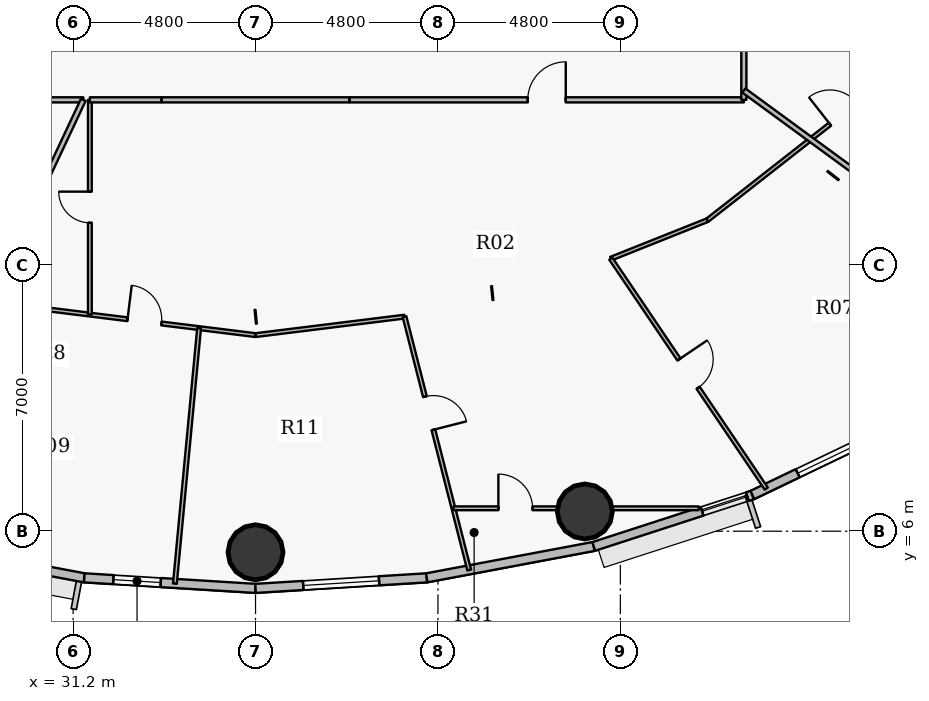
"""IFC4 building model, lengths in metres.
Left out: names, types, materials, properties, quantities, classifications, styles, units other than length and angle.
Written with IfcOpenShell. Run it as: python <this file> out.ifc"""

import sys

from ifc_helpers import new_model, si_unit, direction, frame, frame_2d, origin, origin_2d, place, context, subcontext, project, spatial, rectangle, hollow_circle, extrude, source, transform, mapped, element, fill, save


model = new_model("IFC4")
c1 = context("Model", 3, precision=1e-05, world=origin(), true_north=direction((0.0, 1.0)))
c2 = subcontext(c1, "Body", "Model", "MODEL_VIEW")
j1 = project(units=[si_unit("LENGTHUNIT", "METRE"), si_unit("PLANEANGLEUNIT", "RADIAN")], contexts=[c1])
p1 = place(None, origin())
s1 = spatial("IfcSite", under=j1, at=p1, CompositionType="ELEMENT")
p2 = place(p1, origin())
s2 = spatial("IfcBuilding", under=s1, at=p2, CompositionType="ELEMENT")
p3 = place(p2, frame((0.0, 0.0, 134.7)))
s3 = spatial("IfcBuildingStorey", under=s2, at=p3, CompositionType="ELEMENT", Elevation=134.7)
for number, where, z_axis, x_axis in (
    (1, (36.0, 5.445, 0.0), (0.0, 0.0, 1.0), (1.0, 0.0, 0.0)),
    (2, (44.666, 6.519, 0.0), (0.0, 0.0, 1.0), (1.0, 0.0, 0.0)),
):
    element("IfcColumn", number, at=place(p3, frame(where, z_axis=z_axis, x_axis=x_axis)), inside=s3, PredefinedType="COLUMN", context=c2, shape_type="SweptSolid", body=[
        extrude(hollow_circle(Radius=0.725, WallThickness=0.042, at=origin_2d()), origin(), (0.0, 0.0, 1.0), 3.75),
    ])
p4 = place(p3, frame((31.494, 4.773, 0.0), z_axis=(0.0, 0.0, 1.0), x_axis=(-0.982789252177, 0.184730305596, 0.0)))
e3 = element("IfcWall", 3, at=p4, inside=s3, PredefinedType="SOLIDWALL", context=c2, shape_type="SweptSolid", body=[
    extrude(rectangle(XDim=4.471, YDim=0.24, at=frame_2d((2.235, 0.0))), origin(), (0.0, 0.0, 1.0), 3.5),
])
p5 = place(p4, frame((1.236, 0.0, 0.9)))
e4 = element("IfcOpeningElement", 4, at=p5, cuts=e3, PredefinedType="OPENING", context=c2, shape_type="SweptSolid", body=[
    extrude(rectangle(XDim=2.0, YDim=1.75, at=origin_2d()), frame((1.0, 0.13, 0.875), z_axis=(0.0, -1.0, 0.0), x_axis=(1.0, 0.0, 0.0)), (0.0, 0.0, 1.0), 0.26),
])
p6 = place(p3, frame((36.0, 4.495, 0.0), z_axis=(0.0, 0.0, 1.0), x_axis=(-0.998107531589, 0.061492726276, 0.0)))
e5 = element("IfcWall", 5, at=p6, inside=s3, PredefinedType="SOLIDWALL", context=c2, shape_type="SweptSolid", body=[
    extrude(rectangle(XDim=4.514, YDim=0.24, at=frame_2d((2.257, 0.0))), origin(), (0.0, 0.0, 1.0), 3.5),
])
p7 = place(p6, frame((2.499, 0.0, 0.9)))
e6 = element("IfcOpeningElement", 6, at=p7, cuts=e5, PredefinedType="OPENING", context=c2, shape_type="SweptSolid", body=[
    extrude(rectangle(XDim=1.25, YDim=1.65, at=origin_2d()), frame((0.625, 0.13, 0.825), z_axis=(0.0, -1.0, 0.0), x_axis=(1.0, 0.0, 0.0)), (0.0, 0.0, 1.0), 0.26),
])
p8 = place(p3, frame((40.506, 4.773, 0.0), z_axis=(0.0, 0.0, 1.0), x_axis=(-0.998107531589, -0.061492726276, 0.0)))
e7 = element("IfcWall", 7, at=p8, inside=s3, PredefinedType="SOLIDWALL", context=c2, shape_type="SweptSolid", body=[
    extrude(rectangle(XDim=4.514, YDim=0.24, at=frame_2d((2.257, 0.0))), origin(), (0.0, 0.0, 1.0), 3.5),
])
p9 = place(p8, frame((1.257, 0.0, 0.9)))
e8 = element("IfcOpeningElement", 8, at=p9, cuts=e7, PredefinedType="OPENING", context=c2, shape_type="SweptSolid", body=[
    extrude(rectangle(XDim=2.0, YDim=1.75, at=origin_2d()), frame((1.0, 0.13, 0.875), z_axis=(0.0, -1.0, 0.0), x_axis=(1.0, 0.0, 0.0)), (0.0, 0.0, 1.0), 0.26),
])
p10 = place(p3, frame((44.9, 5.599, 0.0), z_axis=(0.0, 0.0, 1.0), x_axis=(-0.982789252177, -0.184730305596, 0.0)))
e9 = element("IfcWall", 9, at=p10, inside=s3, PredefinedType="SOLIDWALL", context=c2, shape_type="SweptSolid", body=[
    extrude(rectangle(XDim=4.471, YDim=0.24, at=frame_2d((2.235, 0.0))), origin(), (0.0, 0.0, 1.0), 3.5),
])
p11 = place(p3, frame((49.074, 6.953, 0.0), z_axis=(0.0, 0.0, 1.0), x_axis=(-0.951211346073, -0.308540070495, 0.0)))
e10 = element("IfcWall", 10, at=p11, inside=s3, PredefinedType="SOLIDWALL", context=c2, shape_type="SweptSolid", body=[
    extrude(rectangle(XDim=4.388, YDim=0.24, at=frame_2d((2.194, 0.0))), origin(), (0.0, 0.0, 1.0), 3.5),
])
p12 = place(p11, frame((0.14, 0.0, 0.9)))
e11 = element("IfcOpeningElement", 11, at=p12, cuts=e10, PredefinedType="OPENING", context=c2, shape_type="SweptSolid", body=[
    extrude(rectangle(XDim=1.25, YDim=1.65, at=origin_2d()), frame((0.625, 0.13, 0.825), z_axis=(0.0, -1.0, 0.0), x_axis=(1.0, 0.0, 0.0)), (0.0, 0.0, 1.0), 0.26),
])
p13 = place(p3, frame((52.925, 8.801, 0.0), z_axis=(0.0, 0.0, 1.0), x_axis=(-0.901589935876, -0.432591709962, 0.0)))
e12 = element("IfcWall", 12, at=p13, inside=s3, PredefinedType="SOLIDWALL", context=c2, shape_type="SweptSolid", body=[
    extrude(rectangle(XDim=4.272, YDim=0.24, at=frame_2d((2.136, 0.0))), origin(), (0.0, 0.0, 1.0), 3.5),
])
p14 = place(p13, frame((0.949, 0.0, 0.9)))
e13 = element("IfcOpeningElement", 13, at=p14, cuts=e12, PredefinedType="OPENING", context=c2, shape_type="SweptSolid", body=[
    extrude(rectangle(XDim=2.0, YDim=1.75, at=origin_2d()), frame((1.0, 0.13, 0.875), z_axis=(0.0, -1.0, 0.0), x_axis=(1.0, 0.0, 0.0)), (0.0, 0.0, 1.0), 0.26),
])
p15 = place(p3, frame((23.15, 17.35, 0.0), z_axis=(0.0, 0.0, 1.0), x_axis=(1.0, 0.0, 0.0)))
e14 = element("IfcWall", 14, at=p15, inside=s3, PredefinedType="PARTITIONING", context=c2, shape_type="SweptSolid", body=[
    extrude(rectangle(XDim=8.318, YDim=0.135, at=frame_2d((4.159, 0.0))), origin(), (0.0, 0.0, 1.0), 2.935),
])
p16 = place(p15, frame((3.659, 0.0, 0.0)))
e15 = element("IfcOpeningElement", 15, at=p16, cuts=e14, PredefinedType="OPENING", context=c2, shape_type="SweptSolid", body=[
    extrude(rectangle(XDim=1.0, YDim=2.15, at=origin_2d()), frame((0.5, 0.078, 1.075), z_axis=(0.0, -1.0, 0.0), x_axis=(1.0, 0.0, 0.0)), (0.0, 0.0, 1.0), 0.155),
])
p17 = place(p3, frame((26.1, 5.918, 0.0), z_axis=(0.0, 0.0, 1.0), x_axis=(0.425072644526, 0.905159238408, 0.0)))
e16 = element("IfcWall", 16, at=p17, inside=s3, PredefinedType="PARTITIONING", context=c2, shape_type="SweptSolid", body=[
    extrude(rectangle(XDim=12.63, YDim=0.135, at=frame_2d((6.315, 0.0))), origin(), (0.0, 0.0, 1.0), 2.935),
])
p18 = place(p3, frame((29.749, 11.934, 0.0), z_axis=(0.0, 0.0, 1.0), x_axis=(0.992395485088, -0.123090215599, 0.0)))
e17 = element("IfcWall", 17, at=p18, inside=s3, PredefinedType="PARTITIONING", context=c2, shape_type="SweptSolid", body=[
    extrude(rectangle(XDim=6.299, YDim=0.1, at=frame_2d((3.15, 0.0))), origin(), (0.0, 0.0, 1.0), 2.935),
])
p19 = place(p18, frame((2.905, 0.0, 0.0)))
e18 = element("IfcOpeningElement", 18, at=p19, cuts=e17, PredefinedType="OPENING", context=c2, shape_type="SweptSolid", body=[
    extrude(rectangle(XDim=0.9, YDim=2.1, at=origin_2d()), frame((0.45, 0.06, 1.05), z_axis=(0.0, -1.0, 0.0), x_axis=(1.0, 0.0, 0.0)), (0.0, 0.0, 1.0), 0.12),
])
p20 = place(p3, frame((31.641, 11.7, 0.0), z_axis=(0.0, 0.0, 1.0), x_axis=(0.0, 1.0, 0.0)))
e19 = element("IfcWall", 19, at=p20, inside=s3, PredefinedType="PARTITIONING", context=c2, shape_type="SweptSolid", body=[
    extrude(rectangle(XDim=5.65, YDim=0.1, at=frame_2d((2.825, 0.0))), origin(), (0.0, 0.0, 1.0), 3.5),
])
p21 = place(p20, frame((2.415, 0.0, 0.0)))
e20 = element("IfcOpeningElement", 20, at=p21, cuts=e19, PredefinedType="OPENING", context=c2, shape_type="SweptSolid", body=[
    extrude(rectangle(XDim=0.82, YDim=2.1, at=origin_2d()), frame((0.41, 0.06, 1.05), z_axis=(0.0, -1.0, 0.0), x_axis=(1.0, 0.0, 0.0)), (0.0, 0.0, 1.0), 0.12),
])
p22 = place(p3, frame((31.641, 17.35, 0.0), z_axis=(0.0, 0.0, 1.0), x_axis=(1.0, 0.0, 0.0)))
e21 = element("IfcWall", 21, at=p22, inside=s3, PredefinedType="PARTITIONING", context=c2, shape_type="SweptSolid", body=[
    extrude(rectangle(XDim=1.882, YDim=0.135, at=frame_2d((0.941, 0.0))), origin(), (0.0, 0.0, 1.0), 3.5),
])
p23 = place(p3, frame((33.878, 4.621, 0.0), z_axis=(0.0, 0.0, 1.0), x_axis=(0.094368865944, 0.995537300728, 0.0)))
e22 = element("IfcWall", 22, at=p23, inside=s3, PredefinedType="PARTITIONING", context=c2, shape_type="SweptSolid", body=[
    extrude(rectangle(XDim=6.752, YDim=0.1, at=frame_2d((3.376, 0.0))), origin(), (0.0, 0.0, 1.0), 2.935),
])
p24 = place(p3, frame((36.0, 11.159, 0.0), z_axis=(0.0, 0.0, 1.0), x_axis=(0.992393437711, 0.123106721131, 0.0)))
e23 = element("IfcWall", 23, at=p24, inside=s3, PredefinedType="PARTITIONING", context=c2, shape_type="SweptSolid", body=[
    extrude(rectangle(XDim=3.95, YDim=0.1, at=frame_2d((1.975, 0.0))), origin(), (0.0, 0.0, 1.0), 2.935),
])
p25 = place(p3, frame((38.477, 17.35, 0.0), z_axis=(0.0, 0.0, 1.0), x_axis=(1.0, 0.0, 0.0)))
e24 = element("IfcWall", 24, at=p25, inside=s3, PredefinedType="PARTITIONING", context=c2, shape_type="SweptSolid", body=[
    extrude(rectangle(XDim=10.373, YDim=0.135, at=frame_2d((5.187, 0.0))), origin(), (0.0, 0.0, 1.0), 2.935),
])
p26 = place(p25, frame((4.687, 0.0, 0.0)))
e25 = element("IfcOpeningElement", 25, at=p26, cuts=e24, PredefinedType="OPENING", context=c2, shape_type="SweptSolid", body=[
    extrude(rectangle(XDim=1.0, YDim=2.15, at=origin_2d()), frame((0.5, 0.078, 1.075), z_axis=(0.0, -1.0, 0.0), x_axis=(1.0, 0.0, 0.0)), (0.0, 0.0, 1.0), 0.155),
])
p27 = place(p3, frame((39.92, 11.645, 0.0), z_axis=(0.0, 0.0, 1.0), x_axis=(0.24735773306, -0.968924224021, 0.0)))
e26 = element("IfcWall", 26, at=p27, inside=s3, PredefinedType="PARTITIONING", context=c2, shape_type="SweptSolid", body=[
    extrude(rectangle(XDim=6.881, YDim=0.1, at=frame_2d((3.441, 0.0))), origin(), (0.0, 0.0, 1.0), 2.935),
])
p28 = place(p27, frame((2.172, 0.0, 0.0)))
e27 = element("IfcOpeningElement", 27, at=p28, cuts=e26, PredefinedType="OPENING", context=c2, shape_type="SweptSolid", body=[
    extrude(rectangle(XDim=0.9, YDim=2.1, at=origin_2d()), frame((0.45, 0.06, 1.05), z_axis=(0.0, -1.0, 0.0), x_axis=(1.0, 0.0, 0.0)), (0.0, 0.0, 1.0), 0.12),
])
p29 = place(p3, frame((41.208, 6.603, 0.0), z_axis=(0.0, 0.0, 1.0), x_axis=(1.0, 0.0, 0.0)))
e28 = element("IfcWall", 28, at=p29, inside=s3, PredefinedType="PARTITIONING", context=c2, shape_type="SweptSolid", body=[
    extrude(rectangle(XDim=6.453, YDim=0.1, at=frame_2d((3.227, 0.0))), origin(), (0.0, 0.0, 1.0), 2.935),
])
p30 = place(p29, frame((1.183, 0.0, 0.0)))
e29 = element("IfcOpeningElement", 29, at=p30, cuts=e28, PredefinedType="OPENING", context=c2, shape_type="SweptSolid", body=[
    extrude(rectangle(XDim=0.9, YDim=2.1, at=origin_2d()), frame((0.45, 0.06, 1.05), z_axis=(0.0, -1.0, 0.0), x_axis=(1.0, 0.0, 0.0)), (0.0, 0.0, 1.0), 0.12),
])
p31 = place(p3, frame((45.35, 13.17, 0.0), z_axis=(0.0, 0.0, 1.0), x_axis=(0.928802486491, 0.370575149044, 0.0)))
e30 = element("IfcWall", 30, at=p31, inside=s3, PredefinedType="PARTITIONING", context=c2, shape_type="SweptSolid", body=[
    extrude(rectangle(XDim=2.736, YDim=0.1, at=frame_2d((1.368, 0.0))), origin(), (0.0, 0.0, 1.0), 3.5),
])
p32 = place(p3, frame((45.35, 13.17, 0.0), z_axis=(0.0, 0.0, 1.0), x_axis=(0.560082631059, -0.828436748573, 0.0)))
e31 = element("IfcWall", 31, at=p32, inside=s3, PredefinedType="PARTITIONING", context=c2, shape_type="SweptSolid", body=[
    extrude(rectangle(XDim=7.301, YDim=0.1, at=frame_2d((3.65, 0.0))), origin(), (0.0, 0.0, 1.0), 2.935),
])
p33 = place(p32, frame((3.2, 0.0, 0.0)))
e32 = element("IfcOpeningElement", 32, at=p33, cuts=e31, PredefinedType="OPENING", context=c2, shape_type="SweptSolid", body=[
    extrude(rectangle(XDim=0.9, YDim=2.1, at=origin_2d()), frame((0.45, 0.06, 1.05), z_axis=(0.0, -1.0, 0.0), x_axis=(1.0, 0.0, 0.0)), (0.0, 0.0, 1.0), 0.12),
])
p34 = place(p3, frame((47.891, 14.184, 0.0), z_axis=(0.0, 0.0, 1.0), x_axis=(0.787333679705, 0.616527109544, 0.0)))
e33 = element("IfcWall", 33, at=p34, inside=s3, PredefinedType="PARTITIONING", context=c2, shape_type="SweptSolid", body=[
    extrude(rectangle(XDim=5.685, YDim=0.1, at=frame_2d((2.842, 0.0))), origin(), (0.0, 0.0, 1.0), 2.935),
])
p35 = place(p34, frame((4.096, 0.0, 0.0)))
e34 = element("IfcOpeningElement", 34, at=p35, cuts=e33, PredefinedType="OPENING", context=c2, shape_type="SweptSolid", body=[
    extrude(rectangle(XDim=0.9, YDim=2.1, at=origin_2d()), frame((0.45, 0.06, 1.05), z_axis=(0.0, -1.0, 0.0), x_axis=(1.0, 0.0, 0.0)), (0.0, 0.0, 1.0), 0.12),
])
p36 = place(p3, frame((48.85, 17.35, 0.0), z_axis=(0.0, 0.0, 1.0), x_axis=(0.0, 1.0, 0.0)))
e35 = element("IfcWall", 35, at=p36, inside=s3, PredefinedType="PARTITIONING", context=c2, shape_type="SweptSolid", body=[
    extrude(rectangle(XDim=19.3, YDim=0.135, at=frame_2d((9.65, 0.0))), origin(), (0.0, 0.0, 1.0), 2.935),
])
p37 = place(p36, frame((7.609, 0.0, 0.0)))
e36 = element("IfcOpeningElement", 36, at=p37, cuts=e35, PredefinedType="OPENING", context=c2, shape_type="SweptSolid", body=[
    extrude(rectangle(XDim=1.0, YDim=2.15, at=origin_2d()), frame((0.5, 0.078, 1.075), z_axis=(0.0, -1.0, 0.0), x_axis=(1.0, 0.0, 0.0)), (0.0, 0.0, 1.0), 0.155),
])
p38 = place(p3, frame((48.85, 17.595, 0.0), z_axis=(0.0, 0.0, 1.0), x_axis=(0.806958414, -0.590608261096, 0.0)))
e37 = element("IfcWall", 37, at=p38, inside=s3, PredefinedType="PARTITIONING", context=c2, shape_type="SweptSolid", body=[
    extrude(rectangle(XDim=10.063, YDim=0.135, at=frame_2d((5.032, 0.0))), origin(), (0.0, 0.0, 1.0), 2.935),
])
p39 = place(p3, frame((38.467, 17.35, 0.0), z_axis=(0.0, 0.0, 1.0), x_axis=(-1.0, 0.0, 0.0)))
e38 = element("IfcWall", 38, at=p39, inside=s3, PredefinedType="PARTITIONING", context=c2, shape_type="SweptSolid", body=[
    extrude(rectangle(XDim=4.934, YDim=0.135, at=frame_2d((2.467, 0.0))), origin(), (0.0, 0.0, 1.0), 2.935),
])
m1 = source(origin(), c2, "Body", "SweptSolid", [
    extrude(rectangle(XDim=1.25, YDim=1.65, at=origin_2d()), frame((0.625, 0.03, 0.825), z_axis=(0.0, -1.0, 0.0), x_axis=(1.0, 0.0, 0.0)), (0.0, 0.0, 1.0), 0.06),
])
p40 = place(p7, origin())
e39 = element("IfcWindow", 39, at=p40, inside=s3, PartitioningType="SINGLE_PANEL", PredefinedType="WINDOW", context=c2, shape_type="MappedRepresentation", body=[
    mapped(m1, transform((0.0, 0.0, 0.0), x_axis=(1.0, 0.0, 0.0), y_axis=(0.0, 1.0, 0.0), z_axis=(0.0, 0.0, 1.0), scale=1.0)),
])
fill(e6, e39)
m2 = source(origin(), c2, "Body", "SweptSolid", [
    extrude(rectangle(XDim=2.0, YDim=1.75, at=origin_2d()), frame((1.0, 0.03, 0.875), z_axis=(0.0, -1.0, 0.0), x_axis=(1.0, 0.0, 0.0)), (0.0, 0.0, 1.0), 0.06),
])
p41 = place(p9, origin())
e40 = element("IfcWindow", 40, at=p41, inside=s3, PartitioningType="DOUBLE_PANEL_VERTICAL", PredefinedType="WINDOW", context=c2, shape_type="MappedRepresentation", body=[
    mapped(m2, transform((0.0, 0.0, 0.0), x_axis=(1.0, 0.0, 0.0), y_axis=(0.0, 1.0, 0.0), z_axis=(0.0, 0.0, 1.0), scale=1.0)),
])
fill(e8, e40)
p42 = place(p14, origin())
e41 = element("IfcWindow", 41, at=p42, inside=s3, PartitioningType="DOUBLE_PANEL_VERTICAL", PredefinedType="WINDOW", context=c2, shape_type="MappedRepresentation", body=[
    mapped(m2, transform((0.0, 0.0, 0.0), x_axis=(1.0, 0.0, 0.0), y_axis=(0.0, 1.0, 0.0), z_axis=(0.0, 0.0, 1.0), scale=1.0)),
])
fill(e13, e41)
p43 = place(p12, origin())
e42 = element("IfcWindow", 42, at=p43, inside=s3, PartitioningType="SINGLE_PANEL", PredefinedType="WINDOW", context=c2, shape_type="MappedRepresentation", body=[
    mapped(m1, transform((0.0, 0.0, 0.0), x_axis=(1.0, 0.0, 0.0), y_axis=(0.0, 1.0, 0.0), z_axis=(0.0, 0.0, 1.0), scale=1.0)),
])
fill(e11, e42)
m3 = source(origin(), c2, "Body", "SweptSolid", [
    extrude(rectangle(XDim=1.0, YDim=2.15, at=origin_2d()), frame((0.5, 0.025, 1.075), z_axis=(0.0, -1.0, 0.0), x_axis=(1.0, 0.0, 0.0)), (0.0, 0.0, 1.0), 0.05),
])
p44 = place(p26, origin())
e43 = element("IfcDoor", 43, at=p44, inside=s3, OperationType="SINGLE_SWING_RIGHT", PredefinedType="DOOR", context=c2, shape_type="MappedRepresentation", body=[
    mapped(m3, transform((0.0, 0.0, 0.0), x_axis=(1.0, 0.0, 0.0), y_axis=(0.0, 1.0, 0.0), z_axis=(0.0, 0.0, 1.0), scale=1.0)),
])
fill(e25, e43)
m4 = source(origin(), c2, "Body", "SweptSolid", [
    extrude(rectangle(XDim=0.9, YDim=2.1, at=origin_2d()), frame((0.45, 0.025, 1.05), z_axis=(0.0, -1.0, 0.0), x_axis=(1.0, 0.0, 0.0)), (0.0, 0.0, 1.0), 0.05),
])
p45 = place(p19, origin())
e44 = element("IfcDoor", 44, at=p45, inside=s3, OperationType="SINGLE_SWING_LEFT", PredefinedType="DOOR", context=c2, shape_type="MappedRepresentation", body=[
    mapped(m4, transform((0.0, 0.0, 0.0), x_axis=(1.0, 0.0, 0.0), y_axis=(0.0, 1.0, 0.0), z_axis=(0.0, 0.0, 1.0), scale=1.0)),
])
fill(e18, e44)
p46 = place(p28, origin())
e45 = element("IfcDoor", 45, at=p46, inside=s3, OperationType="SINGLE_SWING_RIGHT", PredefinedType="DOOR", context=c2, shape_type="MappedRepresentation", body=[
    mapped(m4, transform((0.0, 0.0, 0.0), x_axis=(1.0, 0.0, 0.0), y_axis=(0.0, 1.0, 0.0), z_axis=(0.0, 0.0, 1.0), scale=1.0)),
])
fill(e27, e45)
p47 = place(p33, origin())
e46 = element("IfcDoor", 46, at=p47, inside=s3, OperationType="SINGLE_SWING_LEFT", PredefinedType="DOOR", context=c2, shape_type="MappedRepresentation", body=[
    mapped(m4, transform((0.0, 0.0, 0.0), x_axis=(1.0, 0.0, 0.0), y_axis=(0.0, 1.0, 0.0), z_axis=(0.0, 0.0, 1.0), scale=1.0)),
])
fill(e32, e46)
m5 = source(origin(), c2, "Body", "SweptSolid", [
    extrude(rectangle(XDim=0.82, YDim=2.1, at=origin_2d()), frame((0.41, 0.025, 1.05), z_axis=(0.0, -1.0, 0.0), x_axis=(1.0, 0.0, 0.0)), (0.0, 0.0, 1.0), 0.05),
])
p48 = place(p21, origin())
e47 = element("IfcDoor", 47, at=p48, inside=s3, OperationType="SINGLE_SWING_RIGHT", PredefinedType="DOOR", context=c2, shape_type="MappedRepresentation", body=[
    mapped(m5, transform((0.0, 0.0, 0.0), x_axis=(1.0, 0.0, 0.0), y_axis=(0.0, 1.0, 0.0), z_axis=(0.0, 0.0, 1.0), scale=1.0)),
])
fill(e20, e47)
p49 = place(p30, origin())
e48 = element("IfcDoor", 48, at=p49, inside=s3, OperationType="SINGLE_SWING_LEFT", PredefinedType="DOOR", context=c2, shape_type="MappedRepresentation", body=[
    mapped(m4, transform((0.0, 0.0, 0.0), x_axis=(1.0, 0.0, 0.0), y_axis=(0.0, 1.0, 0.0), z_axis=(0.0, 0.0, 1.0), scale=1.0)),
])
fill(e29, e48)
p50 = place(p35, origin())
e49 = element("IfcDoor", 49, at=p50, inside=s3, OperationType="SINGLE_SWING_LEFT", PredefinedType="DOOR", context=c2, shape_type="MappedRepresentation", body=[
    mapped(m4, transform((0.0, 0.0, 0.0), x_axis=(1.0, 0.0, 0.0), y_axis=(0.0, 1.0, 0.0), z_axis=(0.0, 0.0, 1.0), scale=1.0)),
])
fill(e34, e49)
save(model, sys.argv[1])
